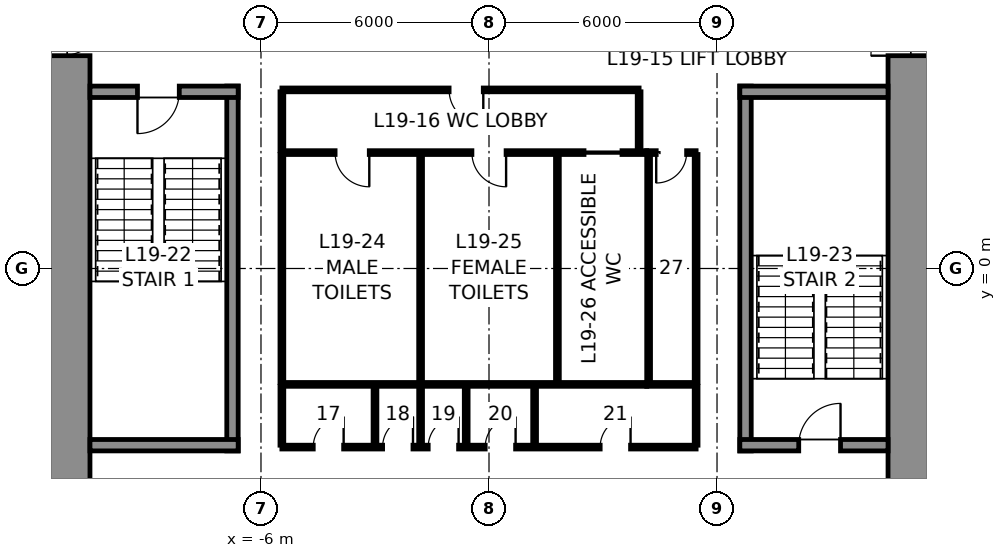
"""IFC4 building model, lengths in metres.
Left out: names, types, materials, properties, quantities, classifications, styles, units other than length and angle.
Written with IfcOpenShell. Run it as: python <this file> out.ifc"""

import sys

from ifc_helpers import new_model, si_unit, direction, frame, frame_2d, origin, place, context, subcontext, project, spatial, rectangle, extrude, element, fill, save


model = new_model("IFC4")
c1 = context("Model", 3, precision=1e-05, world=origin(), true_north=direction((0.0, 1.0)))
c2 = subcontext(c1, "Body", "Model", "MODEL_VIEW")
j1 = project(units=[si_unit("LENGTHUNIT", "METRE"), si_unit("PLANEANGLEUNIT", "RADIAN")], contexts=[c1])
p1 = place(None, origin())
s1 = spatial("IfcSite", under=j1, at=p1, CompositionType="ELEMENT")
p2 = place(p1, origin())
s2 = spatial("IfcBuilding", under=s1, at=p2, CompositionType="ELEMENT")
p3 = place(p2, frame((0.0, 0.0, 99.8)))
s3 = spatial("IfcBuildingStorey", under=s2, at=p3, CompositionType="ELEMENT", Elevation=99.8)
p4 = place(p3, frame((11.25, 10.5, 0.0), z_axis=(0.0, 0.0, 1.0), x_axis=(0.0, -1.0, 0.0)))
e1 = element("IfcWall", 1, at=p4, inside=s3, PredefinedType="SHEAR", context=c2, shape_type="SweptSolid", body=[
    extrude(rectangle(XDim=21.0, YDim=1.5, at=frame_2d((10.5, 0.0))), origin(), (0.0, 0.0, 1.0), 4.6),
])
p5 = place(p4, frame((3.7, 0.0, 0.0)))
e2 = element("IfcOpeningElement", 2, at=p5, cuts=e1, PredefinedType="OPENING", context=c2, shape_type="SweptSolid", body=[
    extrude(rectangle(XDim=1.2, YDim=2.3, at=frame_2d((0.6, 1.15))), frame((0.0, 0.76, 0.0), z_axis=(0.0, -1.0, 0.0), x_axis=(1.0, 0.0, 0.0)), (0.0, 0.0, 1.0), 1.52),
])
p6 = place(p4, frame((16.1, 0.0, 0.0)))
e3 = element("IfcOpeningElement", 3, at=p6, cuts=e1, PredefinedType="OPENING", context=c2, shape_type="SweptSolid", body=[
    extrude(rectangle(XDim=1.2, YDim=2.3, at=frame_2d((0.6, 1.15))), frame((0.0, 0.76, 0.0), z_axis=(0.0, -1.0, 0.0), x_axis=(1.0, 0.0, 0.0)), (0.0, 0.0, 1.0), 1.52),
])
p7 = place(p3, frame((-11.25, -10.5, 0.0), z_axis=(0.0, 0.0, 1.0), x_axis=(0.0, 1.0, 0.0)))
e4 = element("IfcWall", 4, at=p7, inside=s3, PredefinedType="SHEAR", context=c2, shape_type="SweptSolid", body=[
    extrude(rectangle(XDim=21.0, YDim=1.5, at=frame_2d((10.5, 0.0))), origin(), (0.0, 0.0, 1.0), 4.6),
])
p8 = place(p7, frame((16.1, 0.0, 0.0)))
e5 = element("IfcOpeningElement", 5, at=p8, cuts=e4, PredefinedType="OPENING", context=c2, shape_type="SweptSolid", body=[
    extrude(rectangle(XDim=1.2, YDim=2.3, at=frame_2d((0.6, 1.15))), frame((0.0, 0.76, 0.0), z_axis=(0.0, -1.0, 0.0), x_axis=(1.0, 0.0, 0.0)), (0.0, 0.0, 1.0), 1.52),
])
p9 = place(p7, frame((3.7, 0.0, 0.0)))
e6 = element("IfcOpeningElement", 6, at=p9, cuts=e4, PredefinedType="OPENING", context=c2, shape_type="SweptSolid", body=[
    extrude(rectangle(XDim=1.2, YDim=2.3, at=frame_2d((0.6, 1.15))), frame((0.0, 0.76, 0.0), z_axis=(0.0, -1.0, 0.0), x_axis=(1.0, 0.0, 0.0)), (0.0, 0.0, 1.0), 1.52),
])
p10 = place(p3, frame((-6.75, -4.8, 0.0), z_axis=(0.0, 0.0, 1.0), x_axis=(0.0, 1.0, 0.0)))
e7 = element("IfcWall", 7, at=p10, inside=s3, PredefinedType="SOLIDWALL", context=c2, shape_type="SweptSolid", body=[
    extrude(rectangle(XDim=9.6, YDim=0.3, at=frame_2d((4.8, 0.0))), origin(), (0.0, 0.0, 1.0), 4.35),
])
p11 = place(p3, frame((-10.5, 4.65, 0.0), z_axis=(0.0, 0.0, 1.0), x_axis=(1.0, 0.0, 0.0)))
e8 = element("IfcWall", 8, at=p11, inside=s3, PredefinedType="SOLIDWALL", context=c2, shape_type="SweptSolid", body=[
    extrude(rectangle(XDim=3.9, YDim=0.3, at=frame_2d((1.95, 0.0))), origin(), (0.0, 0.0, 1.0), 4.35),
])
p12 = place(p11, frame((1.25, 0.0, 0.0)))
e9 = element("IfcOpeningElement", 9, at=p12, cuts=e8, PredefinedType="OPENING", context=c2, shape_type="SweptSolid", body=[
    extrude(rectangle(XDim=1.1, YDim=2.3, at=frame_2d((0.55, 1.15))), frame((0.0, 0.16, 0.0), z_axis=(0.0, -1.0, 0.0), x_axis=(1.0, 0.0, 0.0)), (0.0, 0.0, 1.0), 0.32),
])
p13 = place(p3, frame((-6.6, -4.65, 0.0), z_axis=(0.0, 0.0, 1.0), x_axis=(-1.0, 0.0, 0.0)))
e10 = element("IfcWall", 10, at=p13, inside=s3, PredefinedType="SOLIDWALL", context=c2, shape_type="SweptSolid", body=[
    extrude(rectangle(XDim=3.9, YDim=0.3, at=frame_2d((1.95, 0.0))), origin(), (0.0, 0.0, 1.0), 4.35),
])
p14 = place(p3, frame((6.75, -4.8, 0.0), z_axis=(0.0, 0.0, 1.0), x_axis=(0.0, 1.0, 0.0)))
e11 = element("IfcWall", 11, at=p14, inside=s3, PredefinedType="SOLIDWALL", context=c2, shape_type="SweptSolid", body=[
    extrude(rectangle(XDim=9.6, YDim=0.3, at=frame_2d((4.8, 0.0))), origin(), (0.0, 0.0, 1.0), 4.35),
])
p15 = place(p3, frame((6.6, 4.65, 0.0), z_axis=(0.0, 0.0, 1.0), x_axis=(1.0, 0.0, 0.0)))
e12 = element("IfcWall", 12, at=p15, inside=s3, PredefinedType="SOLIDWALL", context=c2, shape_type="SweptSolid", body=[
    extrude(rectangle(XDim=3.9, YDim=0.3, at=frame_2d((1.95, 0.0))), origin(), (0.0, 0.0, 1.0), 4.35),
])
p16 = place(p3, frame((10.5, -4.65, 0.0), z_axis=(0.0, 0.0, 1.0), x_axis=(-1.0, 0.0, 0.0)))
e13 = element("IfcWall", 13, at=p16, inside=s3, PredefinedType="SOLIDWALL", context=c2, shape_type="SweptSolid", body=[
    extrude(rectangle(XDim=3.9, YDim=0.3, at=frame_2d((1.95, 0.0))), origin(), (0.0, 0.0, 1.0), 4.35),
])
p17 = place(p16, frame((1.25, 0.0, 0.0)))
e14 = element("IfcOpeningElement", 14, at=p17, cuts=e13, PredefinedType="OPENING", context=c2, shape_type="SweptSolid", body=[
    extrude(rectangle(XDim=1.1, YDim=2.3, at=frame_2d((0.55, 1.15))), frame((0.0, 0.16, 0.0), z_axis=(0.0, -1.0, 0.0), x_axis=(1.0, 0.0, 0.0)), (0.0, 0.0, 1.0), 0.32),
])
p18 = place(p3, frame((-5.45, 3.05, 0.0), z_axis=(0.0, 0.0, 1.0), x_axis=(1.0, 0.0, 0.0)))
e15 = element("IfcWall", 15, at=p18, inside=s3, PredefinedType="PARTITIONING", context=c2, shape_type="SweptSolid", body=[
    extrude(rectangle(XDim=9.6, YDim=0.1, at=frame_2d((4.8, 0.0))), origin(), (0.0, 0.0, 1.0), 4.35),
])
p19 = place(p18, frame((1.4, 0.0, 0.0)))
e16 = element("IfcOpeningElement", 16, at=p19, cuts=e15, PredefinedType="OPENING", context=c2, shape_type="SweptSolid", body=[
    extrude(rectangle(XDim=0.9, YDim=2.3, at=frame_2d((0.45, 1.15))), frame((0.0, 0.06, 0.0), z_axis=(0.0, -1.0, 0.0), x_axis=(1.0, 0.0, 0.0)), (0.0, 0.0, 1.0), 0.12),
])
p20 = place(p18, frame((5.0, 0.0, 0.0)))
e17 = element("IfcOpeningElement", 17, at=p20, cuts=e15, PredefinedType="OPENING", context=c2, shape_type="SweptSolid", body=[
    extrude(rectangle(XDim=0.9, YDim=2.3, at=frame_2d((0.45, 1.15))), frame((0.0, 0.06, 0.0), z_axis=(0.0, -1.0, 0.0), x_axis=(1.0, 0.0, 0.0)), (0.0, 0.0, 1.0), 0.12),
])
p21 = place(p18, frame((7.95, 0.0, 0.0)))
e18 = element("IfcOpeningElement", 18, at=p21, cuts=e15, PredefinedType="OPENING", context=c2, shape_type="SweptSolid", body=[
    extrude(rectangle(XDim=1.0, YDim=2.3, at=frame_2d((0.5, 1.15))), frame((0.0, 0.06, 0.0), z_axis=(0.0, -1.0, 0.0), x_axis=(1.0, 0.0, 0.0)), (0.0, 0.0, 1.0), 0.12),
])
p22 = place(p3, frame((4.15, 3.05, 0.0), z_axis=(0.0, 0.0, 1.0), x_axis=(1.0, 0.0, 0.0)))
e19 = element("IfcWall", 19, at=p22, inside=s3, PredefinedType="PARTITIONING", context=c2, shape_type="SweptSolid", body=[
    extrude(rectangle(XDim=1.3, YDim=0.1, at=frame_2d((0.65, 0.0))), origin(), (0.0, 0.0, 1.0), 4.35),
])
p23 = place(p22, frame((0.25, 0.0, 0.0)))
e20 = element("IfcOpeningElement", 20, at=p23, cuts=e19, PredefinedType="OPENING", context=c2, shape_type="SweptSolid", body=[
    extrude(rectangle(XDim=0.8, YDim=2.3, at=frame_2d((0.4, 1.15))), frame((0.0, 0.06, 0.0), z_axis=(0.0, -1.0, 0.0), x_axis=(1.0, 0.0, 0.0)), (0.0, 0.0, 1.0), 0.12),
])
p24 = place(p3, frame((4.15, -3.05, 0.0), z_axis=(0.0, 0.0, 1.0), x_axis=(-1.0, 0.0, 0.0)))
e21 = element("IfcWall", 21, at=p24, inside=s3, PredefinedType="PARTITIONING", context=c2, shape_type="SweptSolid", body=[
    extrude(rectangle(XDim=9.6, YDim=0.1, at=frame_2d((4.8, 0.0))), origin(), (0.0, 0.0, 1.0), 4.35),
])
p25 = place(p3, frame((5.45, -3.05, 0.0), z_axis=(0.0, 0.0, 1.0), x_axis=(-1.0, 0.0, 0.0)))
e22 = element("IfcWall", 22, at=p25, inside=s3, PredefinedType="PARTITIONING", context=c2, shape_type="SweptSolid", body=[
    extrude(rectangle(XDim=1.3, YDim=0.1, at=frame_2d((0.65, 0.0))), origin(), (0.0, 0.0, 1.0), 4.35),
])
for number, where, z_axis, x_axis in (
    (23, (5.45, 3.0, 0.0), (0.0, 0.0, 1.0), (0.0, -1.0, 0.0)),
    (24, (-5.45, -3.0, 0.0), (0.0, 0.0, 1.0), (0.0, 1.0, 0.0)),
    (25, (-1.8, -3.0, 0.0), (0.0, 0.0, 1.0), (0.0, 1.0, 0.0)),
    (26, (1.8, -3.0, 0.0), (0.0, 0.0, 1.0), (0.0, 1.0, 0.0)),
    (27, (4.2, -3.0, 0.0), (0.0, 0.0, 1.0), (0.0, 1.0, 0.0)),
):
    element("IfcWall", number, at=place(p3, frame(where, z_axis=z_axis, x_axis=x_axis)), inside=s3, PredefinedType="PARTITIONING", context=c2, shape_type="SweptSolid", body=[
        extrude(rectangle(XDim=6.0, YDim=0.1, at=frame_2d((3.0, 0.0))), origin(), (0.0, 0.0, 1.0), 4.35),
    ])
p26 = place(p3, frame((-5.45, 4.7, 0.0), z_axis=(0.0, 0.0, 1.0), x_axis=(1.0, 0.0, 0.0)))
e28 = element("IfcWall", 28, at=p26, inside=s3, PredefinedType="PARTITIONING", context=c2, shape_type="SweptSolid", body=[
    extrude(rectangle(XDim=9.4, YDim=0.1, at=frame_2d((4.7, 0.0))), origin(), (0.0, 0.0, 1.0), 4.35),
])
p27 = place(p26, frame((4.4, 0.0, 0.0)))
e29 = element("IfcOpeningElement", 29, at=p27, cuts=e28, PredefinedType="OPENING", context=c2, shape_type="SweptSolid", body=[
    extrude(rectangle(XDim=0.9, YDim=2.3, at=frame_2d((0.45, 1.15))), frame((0.0, 0.06, 0.0), z_axis=(0.0, -1.0, 0.0), x_axis=(1.0, 0.0, 0.0)), (0.0, 0.0, 1.0), 0.12),
])
for number, where, z_axis, x_axis in (
    (30, (-5.45, 3.1, 0.0), (0.0, 0.0, 1.0), (0.0, 1.0, 0.0)),
    (31, (3.95, 3.1, 0.0), (0.0, 0.0, 1.0), (0.0, 1.0, 0.0)),
):
    element("IfcWall", number, at=place(p3, frame(where, z_axis=z_axis, x_axis=x_axis)), inside=s3, PredefinedType="PARTITIONING", context=c2, shape_type="SweptSolid", body=[
        extrude(rectangle(XDim=1.55, YDim=0.1, at=frame_2d((0.775, 0.0))), origin(), (0.0, 0.0, 1.0), 4.35),
    ])
p28 = place(p3, frame((5.45, -4.7, 0.0), z_axis=(0.0, 0.0, 1.0), x_axis=(-1.0, 0.0, 0.0)))
e32 = element("IfcWall", 32, at=p28, inside=s3, PredefinedType="PARTITIONING", context=c2, shape_type="SweptSolid", body=[
    extrude(rectangle(XDim=10.9, YDim=0.1, at=frame_2d((5.45, 0.0))), origin(), (0.0, 0.0, 1.0), 4.35),
])
p29 = place(p28, frame((9.275, 0.0, 0.0)))
e33 = element("IfcOpeningElement", 33, at=p29, cuts=e32, PredefinedType="OPENING", context=c2, shape_type="SweptSolid", body=[
    extrude(rectangle(XDim=0.8, YDim=2.3, at=frame_2d((0.4, 1.15))), frame((0.0, 0.06, 0.0), z_axis=(0.0, -1.0, 0.0), x_axis=(1.0, 0.0, 0.0)), (0.0, 0.0, 1.0), 0.12),
])
p30 = place(p28, frame((7.45, 0.0, 0.0)))
e34 = element("IfcOpeningElement", 34, at=p30, cuts=e32, PredefinedType="OPENING", context=c2, shape_type="SweptSolid", body=[
    extrude(rectangle(XDim=0.8, YDim=2.3, at=frame_2d((0.4, 1.15))), frame((0.0, 0.06, 0.0), z_axis=(0.0, -1.0, 0.0), x_axis=(1.0, 0.0, 0.0)), (0.0, 0.0, 1.0), 0.12),
])
p31 = place(p28, frame((6.25, 0.0, 0.0)))
e35 = element("IfcOpeningElement", 35, at=p31, cuts=e32, PredefinedType="OPENING", context=c2, shape_type="SweptSolid", body=[
    extrude(rectangle(XDim=0.8, YDim=2.3, at=frame_2d((0.4, 1.15))), frame((0.0, 0.06, 0.0), z_axis=(0.0, -1.0, 0.0), x_axis=(1.0, 0.0, 0.0)), (0.0, 0.0, 1.0), 0.12),
])
p32 = place(p28, frame((4.75, 0.0, 0.0)))
e36 = element("IfcOpeningElement", 36, at=p32, cuts=e32, PredefinedType="OPENING", context=c2, shape_type="SweptSolid", body=[
    extrude(rectangle(XDim=0.8, YDim=2.3, at=frame_2d((0.4, 1.15))), frame((0.0, 0.06, 0.0), z_axis=(0.0, -1.0, 0.0), x_axis=(1.0, 0.0, 0.0)), (0.0, 0.0, 1.0), 0.12),
])
p33 = place(p28, frame((1.725, 0.0, 0.0)))
e37 = element("IfcOpeningElement", 37, at=p33, cuts=e32, PredefinedType="OPENING", context=c2, shape_type="SweptSolid", body=[
    extrude(rectangle(XDim=0.8, YDim=2.3, at=frame_2d((0.4, 1.15))), frame((0.0, 0.06, 0.0), z_axis=(0.0, -1.0, 0.0), x_axis=(1.0, 0.0, 0.0)), (0.0, 0.0, 1.0), 0.12),
])
for number, where, z_axis, x_axis in (
    (38, (-5.45, -3.1, 0.0), (0.0, 0.0, 1.0), (0.0, -1.0, 0.0)),
    (39, (5.45, -3.1, 0.0), (0.0, 0.0, 1.0), (0.0, -1.0, 0.0)),
    (40, (-3.0, -3.1, 0.0), (0.0, 0.0, 1.0), (0.0, -1.0, 0.0)),
    (41, (-1.8, -3.1, 0.0), (0.0, 0.0, 1.0), (0.0, -1.0, 0.0)),
    (42, (-0.6, -3.1, 0.0), (0.0, 0.0, 1.0), (0.0, -1.0, 0.0)),
    (43, (1.2, -3.1, 0.0), (0.0, 0.0, 1.0), (0.0, -1.0, 0.0)),
):
    element("IfcWall", number, at=place(p3, frame(where, z_axis=z_axis, x_axis=x_axis)), inside=s3, PredefinedType="PARTITIONING", context=c2, shape_type="SweptSolid", body=[
        extrude(rectangle(XDim=1.55, YDim=0.1, at=frame_2d((0.775, 0.0))), origin(), (0.0, 0.0, 1.0), 4.35),
    ])
p34 = place(p12, frame((1.1, 0.0, 0.0), z_axis=(0.0, 0.0, 1.0), x_axis=(-1.0, 0.0, 0.0)))
e44 = element("IfcDoor", 44, at=p34, inside=s3, OperationType="SINGLE_SWING_RIGHT", PredefinedType="DOOR", context=c2, shape_type="SweptSolid", body=[
    extrude(rectangle(XDim=1.1, YDim=2.3, at=frame_2d((0.55, 1.15))), frame((0.0, 0.025, 0.0), z_axis=(0.0, -1.0, 0.0), x_axis=(1.0, 0.0, 0.0)), (0.0, 0.0, 1.0), 0.05),
])
fill(e9, e44)
p35 = place(p17, frame((1.1, 0.0, 0.0), z_axis=(0.0, 0.0, 1.0), x_axis=(-1.0, 0.0, 0.0)))
e45 = element("IfcDoor", 45, at=p35, inside=s3, OperationType="SINGLE_SWING_RIGHT", PredefinedType="DOOR", context=c2, shape_type="SweptSolid", body=[
    extrude(rectangle(XDim=1.1, YDim=2.3, at=frame_2d((0.55, 1.15))), frame((0.0, 0.025, 0.0), z_axis=(0.0, -1.0, 0.0), x_axis=(1.0, 0.0, 0.0)), (0.0, 0.0, 1.0), 0.05),
])
fill(e14, e45)
p36 = place(p19, frame((0.9, 0.0, 0.0), z_axis=(0.0, 0.0, 1.0), x_axis=(-1.0, 0.0, 0.0)))
e46 = element("IfcDoor", 46, at=p36, inside=s3, OperationType="SINGLE_SWING_LEFT", PredefinedType="DOOR", context=c2, shape_type="SweptSolid", body=[
    extrude(rectangle(XDim=0.9, YDim=2.3, at=frame_2d((0.45, 1.15))), frame((0.0, 0.025, 0.0), z_axis=(0.0, -1.0, 0.0), x_axis=(1.0, 0.0, 0.0)), (0.0, 0.0, 1.0), 0.05),
])
fill(e16, e46)
p37 = place(p20, frame((0.9, 0.0, 0.0), z_axis=(0.0, 0.0, 1.0), x_axis=(-1.0, 0.0, 0.0)))
e47 = element("IfcDoor", 47, at=p37, inside=s3, OperationType="SINGLE_SWING_LEFT", PredefinedType="DOOR", context=c2, shape_type="SweptSolid", body=[
    extrude(rectangle(XDim=0.9, YDim=2.3, at=frame_2d((0.45, 1.15))), frame((0.0, 0.025, 0.0), z_axis=(0.0, -1.0, 0.0), x_axis=(1.0, 0.0, 0.0)), (0.0, 0.0, 1.0), 0.05),
])
fill(e17, e47)
p38 = place(p21, frame((1.0, 0.0, 0.0), z_axis=(0.0, 0.0, 1.0), x_axis=(-1.0, 0.0, 0.0)))
e48 = element("IfcDoor", 48, at=p38, inside=s3, OperationType="SLIDING_TO_LEFT", PredefinedType="DOOR", context=c2, shape_type="SweptSolid", body=[
    extrude(rectangle(XDim=1.0, YDim=2.3, at=frame_2d((0.5, 1.15))), frame((0.0, 0.025, 0.0), z_axis=(0.0, -1.0, 0.0), x_axis=(1.0, 0.0, 0.0)), (0.0, 0.0, 1.0), 0.05),
])
fill(e18, e48)
p39 = place(p23, frame((0.8, 0.0, 0.0), z_axis=(0.0, 0.0, 1.0), x_axis=(-1.0, 0.0, 0.0)))
e49 = element("IfcDoor", 49, at=p39, inside=s3, OperationType="SINGLE_SWING_RIGHT", PredefinedType="DOOR", context=c2, shape_type="SweptSolid", body=[
    extrude(rectangle(XDim=0.8, YDim=2.3, at=frame_2d((0.4, 1.15))), frame((0.0, 0.025, 0.0), z_axis=(0.0, -1.0, 0.0), x_axis=(1.0, 0.0, 0.0)), (0.0, 0.0, 1.0), 0.05),
])
fill(e20, e49)
p40 = place(p27, frame((0.9, 0.0, 0.0), z_axis=(0.0, 0.0, 1.0), x_axis=(-1.0, 0.0, 0.0)))
e50 = element("IfcDoor", 50, at=p40, inside=s3, OperationType="SINGLE_SWING_LEFT", PredefinedType="DOOR", context=c2, shape_type="SweptSolid", body=[
    extrude(rectangle(XDim=0.9, YDim=2.3, at=frame_2d((0.45, 1.15))), frame((0.0, 0.025, 0.0), z_axis=(0.0, -1.0, 0.0), x_axis=(1.0, 0.0, 0.0)), (0.0, 0.0, 1.0), 0.05),
])
fill(e29, e50)
p41 = place(p29, frame((0.8, 0.0, 0.0), z_axis=(0.0, 0.0, 1.0), x_axis=(-1.0, 0.0, 0.0)))
e51 = element("IfcDoor", 51, at=p41, inside=s3, OperationType="SINGLE_SWING_RIGHT", PredefinedType="DOOR", context=c2, shape_type="SweptSolid", body=[
    extrude(rectangle(XDim=0.8, YDim=2.3, at=frame_2d((0.4, 1.15))), frame((0.0, 0.025, 0.0), z_axis=(0.0, -1.0, 0.0), x_axis=(1.0, 0.0, 0.0)), (0.0, 0.0, 1.0), 0.05),
])
fill(e33, e51)
p42 = place(p30, frame((0.8, 0.0, 0.0), z_axis=(0.0, 0.0, 1.0), x_axis=(-1.0, 0.0, 0.0)))
e52 = element("IfcDoor", 52, at=p42, inside=s3, OperationType="SINGLE_SWING_RIGHT", PredefinedType="DOOR", context=c2, shape_type="SweptSolid", body=[
    extrude(rectangle(XDim=0.8, YDim=2.3, at=frame_2d((0.4, 1.15))), frame((0.0, 0.025, 0.0), z_axis=(0.0, -1.0, 0.0), x_axis=(1.0, 0.0, 0.0)), (0.0, 0.0, 1.0), 0.05),
])
fill(e34, e52)
p43 = place(p31, frame((0.8, 0.0, 0.0), z_axis=(0.0, 0.0, 1.0), x_axis=(-1.0, 0.0, 0.0)))
e53 = element("IfcDoor", 53, at=p43, inside=s3, OperationType="SINGLE_SWING_RIGHT", PredefinedType="DOOR", context=c2, shape_type="SweptSolid", body=[
    extrude(rectangle(XDim=0.8, YDim=2.3, at=frame_2d((0.4, 1.15))), frame((0.0, 0.025, 0.0), z_axis=(0.0, -1.0, 0.0), x_axis=(1.0, 0.0, 0.0)), (0.0, 0.0, 1.0), 0.05),
])
fill(e35, e53)
p44 = place(p32, frame((0.8, 0.0, 0.0), z_axis=(0.0, 0.0, 1.0), x_axis=(-1.0, 0.0, 0.0)))
e54 = element("IfcDoor", 54, at=p44, inside=s3, OperationType="SINGLE_SWING_RIGHT", PredefinedType="DOOR", context=c2, shape_type="SweptSolid", body=[
    extrude(rectangle(XDim=0.8, YDim=2.3, at=frame_2d((0.4, 1.15))), frame((0.0, 0.025, 0.0), z_axis=(0.0, -1.0, 0.0), x_axis=(1.0, 0.0, 0.0)), (0.0, 0.0, 1.0), 0.05),
])
fill(e36, e54)
p45 = place(p33, frame((0.8, 0.0, 0.0), z_axis=(0.0, 0.0, 1.0), x_axis=(-1.0, 0.0, 0.0)))
e55 = element("IfcDoor", 55, at=p45, inside=s3, OperationType="SINGLE_SWING_RIGHT", PredefinedType="DOOR", context=c2, shape_type="SweptSolid", body=[
    extrude(rectangle(XDim=0.8, YDim=2.3, at=frame_2d((0.4, 1.15))), frame((0.0, 0.025, 0.0), z_axis=(0.0, -1.0, 0.0), x_axis=(1.0, 0.0, 0.0)), (0.0, 0.0, 1.0), 0.05),
])
fill(e37, e55)
p46 = place(p8, frame((1.2, 0.0, 0.0), z_axis=(0.0, 0.0, 1.0), x_axis=(-1.0, 0.0, 0.0)))
e56 = element("IfcDoor", 56, at=p46, inside=s3, OperationType="SINGLE_SWING_LEFT", PredefinedType="DOOR", context=c2, shape_type="SweptSolid", body=[
    extrude(rectangle(XDim=1.2, YDim=2.3, at=frame_2d((0.6, 1.15))), frame((0.0, 0.025, 0.0), z_axis=(0.0, -1.0, 0.0), x_axis=(1.0, 0.0, 0.0)), (0.0, 0.0, 1.0), 0.05),
])
fill(e5, e56)
p47 = place(p5, frame((1.2, 0.0, 0.0), z_axis=(0.0, 0.0, 1.0), x_axis=(-1.0, 0.0, 0.0)))
e57 = element("IfcDoor", 57, at=p47, inside=s3, OperationType="SINGLE_SWING_LEFT", PredefinedType="DOOR", context=c2, shape_type="SweptSolid", body=[
    extrude(rectangle(XDim=1.2, YDim=2.3, at=frame_2d((0.6, 1.15))), frame((0.0, 0.025, 0.0), z_axis=(0.0, -1.0, 0.0), x_axis=(1.0, 0.0, 0.0)), (0.0, 0.0, 1.0), 0.05),
])
fill(e2, e57)
save(model, sys.argv[1])
